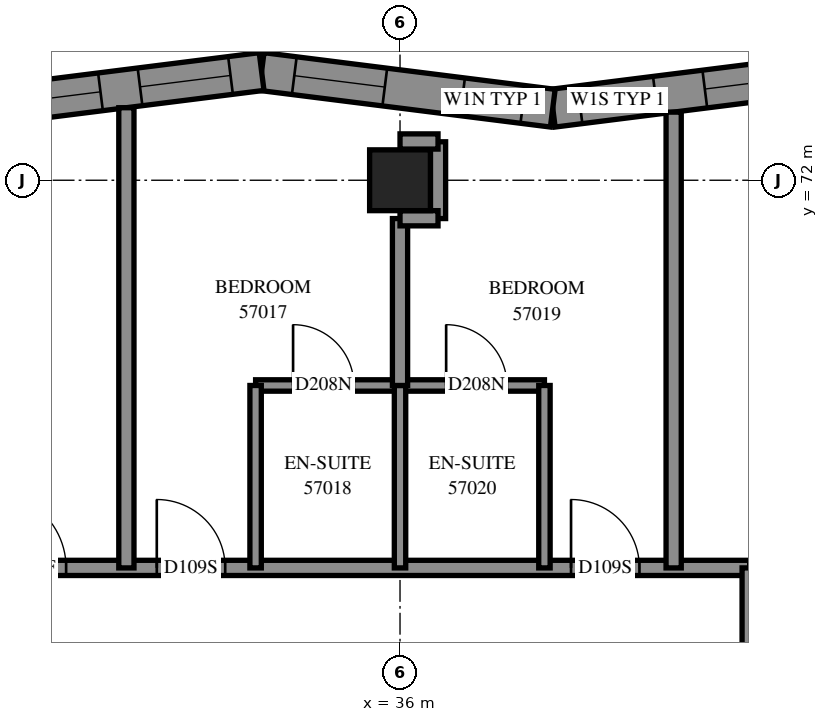
"""IFC4 building model, lengths in metres.
Left out: names, types, materials, properties, quantities, classifications, styles, units other than length and angle.
Written with IfcOpenShell. Run it as: python <this file> out.ifc"""

import sys

from ifc_helpers import new_model, si_unit, direction, frame, frame_2d, origin, origin_2d, place, context, subcontext, project, spatial, polyline, rectangle, outline, extrude, element, fill, save


model = new_model("IFC4")
c1 = context("Model", 3, precision=1e-05, world=origin(), true_north=direction((0.0, 1.0)))
c2 = subcontext(c1, "Body", "Model", "MODEL_VIEW")
j1 = project(units=[si_unit("LENGTHUNIT", "METRE"), si_unit("PLANEANGLEUNIT", "RADIAN")], contexts=[c1])
p1 = place(None, origin())
s1 = spatial("IfcSite", under=j1, at=p1, CompositionType="ELEMENT")
p2 = place(p1, origin())
s2 = spatial("IfcBuilding", under=s1, at=p2, CompositionType="ELEMENT")
p3 = place(p2, frame((0.0, 0.0, 210.0)))
s3 = spatial("IfcBuildingStorey", under=s2, at=p3, CompositionType="ELEMENT", Elevation=210.0)
p4 = place(p3, frame((36.0, 72.0, 0.0), z_axis=(0.0, 0.0, 1.0), x_axis=(1.0, 0.0, 0.0)))
e1 = element("IfcColumn", 1, at=p4, inside=s3, PredefinedType="COLUMN", context=c2, shape_type="SweptSolid", body=[
    extrude(rectangle(XDim=0.8, YDim=0.8, at=origin_2d()), origin(), (0.0, 0.0, 1.0), 3.1),
])
p5 = place(p3, frame((41.84, 73.43, 0.0), z_axis=(0.0, 0.0, 1.0), x_axis=(-0.9921759282, -0.1248476171, 0.0)))
e2 = element("IfcWall", 2, at=p5, inside=s3, PredefinedType="SOLIDWALL", context=c2, shape_type="SweptSolid", body=[
    extrude(outline(polyline([(-0.032, -0.25), (3.829, -0.25), (3.892, 0.25), (0.032, 0.25), (-0.032, -0.25)])), origin(), (0.0, 0.0, 1.0), 3.1),
])
p6 = place(p5, frame((0.645, 0.0, 0.45)))
e3 = element("IfcOpeningElement", 3, at=p6, cuts=e2, PredefinedType="OPENING", context=c2, shape_type="SweptSolid", body=[
    extrude(rectangle(XDim=1.2, YDim=2.5, at=frame_2d((0.6, 1.25))), frame((0.0, 0.26, 0.0), z_axis=(0.0, -1.0, 0.0), x_axis=(1.0, 0.0, 0.0)), (0.0, 0.0, 1.0), 0.52),
])
p7 = place(p5, frame((2.5, 0.0, 0.45)))
e4 = element("IfcOpeningElement", 4, at=p7, cuts=e2, PredefinedType="OPENING", context=c2, shape_type="SweptSolid", body=[
    extrude(rectangle(XDim=1.0, YDim=2.5, at=frame_2d((0.5, 1.25))), frame((0.0, 0.26, 0.0), z_axis=(0.0, -1.0, 0.0), x_axis=(1.0, 0.0, 0.0)), (0.0, 0.0, 1.0), 0.52),
])
p8 = place(p3, frame((38.01, 72.948, 0.0), z_axis=(0.0, 0.0, 1.0), x_axis=(-0.9921763319, 0.1248444087, 0.0)))
e5 = element("IfcWall", 5, at=p8, inside=s3, PredefinedType="SOLIDWALL", context=c2, shape_type="SweptSolid", body=[
    extrude(outline(polyline([(0.032, -0.25), (3.892, -0.25), (3.829, 0.25), (-0.032, 0.25), (0.032, -0.25)])), origin(), (0.0, 0.0, 1.0), 3.1),
])
p9 = place(p8, frame((2.227, 0.0, 0.45)))
e6 = element("IfcOpeningElement", 6, at=p9, cuts=e5, PredefinedType="OPENING", context=c2, shape_type="SweptSolid", body=[
    extrude(rectangle(XDim=1.2, YDim=2.5, at=frame_2d((0.6, 1.25))), frame((0.0, 0.26, 0.0), z_axis=(0.0, -1.0, 0.0), x_axis=(1.0, 0.0, 0.0)), (0.0, 0.0, 1.0), 0.52),
])
p10 = place(p8, frame((0.397, 0.0, 0.45)))
e7 = element("IfcOpeningElement", 7, at=p10, cuts=e5, PredefinedType="OPENING", context=c2, shape_type="SweptSolid", body=[
    extrude(rectangle(XDim=0.8, YDim=2.5, at=frame_2d((0.4, 1.25))), frame((0.0, 0.26, 0.0), z_axis=(0.0, -1.0, 0.0), x_axis=(1.0, 0.0, 0.0)), (0.0, 0.0, 1.0), 0.52),
])
p11 = place(p3, frame((34.179, 73.43, 0.0), z_axis=(0.0, 0.0, 1.0), x_axis=(-0.9921760365, -0.1248467561, 0.0)))
e8 = element("IfcWall", 8, at=p11, inside=s3, PredefinedType="SOLIDWALL", context=c2, shape_type="SweptSolid", body=[
    extrude(outline(polyline([(-0.032, -0.25), (3.829, -0.25), (3.931, 0.25), (0.032, 0.25), (-0.032, -0.25)])), origin(), (0.0, 0.0, 1.0), 3.1),
])
p12 = place(p11, frame((0.412, 0.0, 0.45)))
e9 = element("IfcOpeningElement", 9, at=p12, cuts=e8, PredefinedType="OPENING", context=c2, shape_type="SweptSolid", body=[
    extrude(rectangle(XDim=1.2, YDim=2.5, at=frame_2d((0.6, 1.25))), frame((0.0, 0.26, 0.0), z_axis=(0.0, -1.0, 0.0), x_axis=(1.0, 0.0, 0.0)), (0.0, 0.0, 1.0), 0.52),
])
p13 = place(p11, frame((2.136, 0.0, 0.45)))
e10 = element("IfcOpeningElement", 10, at=p13, cuts=e8, PredefinedType="OPENING", context=c2, shape_type="SweptSolid", body=[
    extrude(rectangle(XDim=1.2, YDim=2.5, at=frame_2d((0.6, 1.25))), frame((0.0, 0.26, 0.0), z_axis=(0.0, -1.0, 0.0), x_axis=(1.0, 0.0, 0.0)), (0.0, 0.0, 1.0), 0.52),
])
p14 = place(p3, frame((28.802, 66.9, 0.0), z_axis=(0.0, 0.0, 1.0), x_axis=(1.0, 0.0, 0.0)))
e11 = element("IfcWall", 11, at=p14, inside=s3, PredefinedType="PARTITIONING", context=c2, shape_type="SweptSolid", body=[
    extrude(rectangle(XDim=11.798, YDim=0.2, at=frame_2d((5.899, 0.0))), origin(), (0.0, 0.0, 1.0), 3.1),
])
p15 = place(p14, frame((1.805, 0.0, 0.0)))
e12 = element("IfcOpeningElement", 12, at=p15, cuts=e11, PredefinedType="OPENING", context=c2, shape_type="SweptSolid", body=[
    extrude(rectangle(XDim=1.0, YDim=2.1, at=frame_2d((0.5, 1.05))), frame((0.0, 0.11, 0.0), z_axis=(0.0, -1.0, 0.0), x_axis=(1.0, 0.0, 0.0)), (0.0, 0.0, 1.0), 0.22),
])
p16 = place(p14, frame((3.998, 0.0, 0.0)))
e13 = element("IfcOpeningElement", 13, at=p16, cuts=e11, PredefinedType="OPENING", context=c2, shape_type="SweptSolid", body=[
    extrude(rectangle(XDim=0.9, YDim=2.1, at=frame_2d((0.45, 1.05))), frame((0.0, 0.11, 0.0), z_axis=(0.0, -1.0, 0.0), x_axis=(1.0, 0.0, 0.0)), (0.0, 0.0, 1.0), 0.22),
])
p17 = place(p14, frame((9.448, 0.0, 0.0)))
e14 = element("IfcOpeningElement", 14, at=p17, cuts=e11, PredefinedType="OPENING", context=c2, shape_type="SweptSolid", body=[
    extrude(rectangle(XDim=0.9, YDim=2.1, at=frame_2d((0.45, 1.05))), frame((0.0, 0.11, 0.0), z_axis=(0.0, -1.0, 0.0), x_axis=(1.0, 0.0, 0.0)), (0.0, 0.0, 1.0), 0.22),
])
p18 = place(p3, frame((32.4, 66.9, 0.0), z_axis=(0.0, 0.0, 1.0), x_axis=(0.0, 1.0, 0.0)))
e15 = element("IfcWall", 15, at=p18, inside=s3, PredefinedType="PARTITIONING", context=c2, shape_type="SweptSolid", body=[
    extrude(rectangle(XDim=6.054, YDim=0.2, at=frame_2d((3.027, 0.0))), origin(), (0.0, 0.0, 1.0), 3.1),
])
p19 = place(p3, frame((39.6, 66.9, 0.0), z_axis=(0.0, 0.0, 1.0), x_axis=(0.0, 1.0, 0.0)))
e16 = element("IfcWall", 16, at=p19, inside=s3, PredefinedType="PARTITIONING", context=c2, shape_type="SweptSolid", body=[
    extrude(rectangle(XDim=5.996, YDim=0.2, at=frame_2d((2.998, 0.0))), origin(), (0.0, 0.0, 1.0), 3.1),
])
p20 = place(p3, frame((40.6, 62.202, 0.0), z_axis=(0.0, 0.0, 1.0), x_axis=(0.0, 1.0, 0.0)))
e17 = element("IfcWall", 17, at=p20, inside=s3, PredefinedType="PARTITIONING", context=c2, shape_type="SweptSolid", body=[
    extrude(rectangle(XDim=4.698, YDim=0.2, at=frame_2d((2.349, 0.0))), origin(), (0.0, 0.0, 1.0), 3.1),
])
p21 = place(p20, frame((2.51, 0.0, 0.0)))
e18 = element("IfcOpeningElement", 18, at=p21, cuts=e17, PredefinedType="OPENING", context=c2, shape_type="SweptSolid", body=[
    extrude(rectangle(XDim=0.9, YDim=2.1, at=frame_2d((0.45, 1.05))), frame((0.0, 0.11, 0.0), z_axis=(0.0, -1.0, 0.0), x_axis=(1.0, 0.0, 0.0)), (0.0, 0.0, 1.0), 0.22),
])
p22 = place(p3, frame((34.1, 69.3, 0.0), z_axis=(0.0, 0.0, 1.0), x_axis=(1.0, 0.0, 0.0)))
e19 = element("IfcWall", 19, at=p22, inside=s3, PredefinedType="PARTITIONING", context=c2, shape_type="SweptSolid", body=[
    extrude(rectangle(XDim=3.8, YDim=0.15, at=frame_2d((1.9, 0.0))), origin(), (0.0, 0.0, 1.0), 3.1),
])
p23 = place(p22, frame((0.493, 0.0, 0.0)))
e20 = element("IfcOpeningElement", 20, at=p23, cuts=e19, PredefinedType="OPENING", context=c2, shape_type="SweptSolid", body=[
    extrude(rectangle(XDim=0.8, YDim=2.1, at=frame_2d((0.4, 1.05))), frame((0.0, 0.085, 0.0), z_axis=(0.0, -1.0, 0.0), x_axis=(1.0, 0.0, 0.0)), (0.0, 0.0, 1.0), 0.17),
])
p24 = place(p22, frame((2.507, 0.0, 0.0)))
e21 = element("IfcOpeningElement", 21, at=p24, cuts=e19, PredefinedType="OPENING", context=c2, shape_type="SweptSolid", body=[
    extrude(rectangle(XDim=0.8, YDim=2.1, at=frame_2d((0.4, 1.05))), frame((0.0, 0.085, 0.0), z_axis=(0.0, -1.0, 0.0), x_axis=(1.0, 0.0, 0.0)), (0.0, 0.0, 1.0), 0.17),
])
for number, where, z_axis, x_axis in (
    (22, (34.1, 66.9, 0.0), (0.0, 0.0, 1.0), (0.0, 1.0, 0.0)),
    (23, (36.0, 66.9, 0.0), (0.0, 0.0, 1.0), (0.0, 1.0, 0.0)),
    (24, (37.9, 66.9, 0.0), (0.0, 0.0, 1.0), (0.0, 1.0, 0.0)),
):
    element("IfcWall", number, at=place(p3, frame(where, z_axis=z_axis, x_axis=x_axis)), inside=s3, PredefinedType="PARTITIONING", context=c2, shape_type="SweptSolid", body=[
        extrude(rectangle(XDim=2.4, YDim=0.15, at=frame_2d((1.2, 0.0))), origin(), (0.0, 0.0, 1.0), 3.1),
    ])
p25 = place(p3, frame((36.0, 69.3, 0.0), z_axis=(0.0, 0.0, 1.0), x_axis=(0.0, 1.0, 0.0)))
e25 = element("IfcWall", 25, at=p25, inside=s3, PredefinedType="PARTITIONING", context=c2, shape_type="SweptSolid", body=[
    extrude(rectangle(XDim=2.196, YDim=0.2, at=frame_2d((1.098, 0.0))), origin(), (0.0, 0.0, 1.0), 3.1),
])
p26 = place(p3, frame((36.5, 71.496, 0.0), z_axis=(0.0, 0.0, 1.0), x_axis=(0.0, 1.0, 0.0)))
e26 = element("IfcWall", 26, at=p26, inside=s3, PredefinedType="PARTITIONING", context=c2, shape_type="SweptSolid", body=[
    extrude(rectangle(XDim=1.01, YDim=0.2, at=frame_2d((0.505, 0.0))), origin(), (0.0, 0.0, 1.0), 3.1),
])
for number, where, z_axis, x_axis in (
    (27, (36.0, 72.51, 0.0), (0.0, 0.0, 1.0), (1.0, 0.0, 0.0)),
    (28, (36.0, 71.5, 0.0), (0.0, 0.0, 1.0), (1.0, 0.0, 0.0)),
):
    element("IfcWall", number, at=place(p3, frame(where, z_axis=z_axis, x_axis=x_axis)), inside=s3, PredefinedType="PARTITIONING", context=c2, shape_type="SweptSolid", body=[
        extrude(rectangle(XDim=0.5, YDim=0.2, at=frame_2d((0.25, 0.0))), origin(), (0.0, 0.0, 1.0), 3.1),
    ])
p27 = place(p6, origin())
e29 = element("IfcWindow", 29, at=p27, inside=s3, PartitioningType="SINGLE_PANEL", PredefinedType="WINDOW", context=c2, shape_type="SweptSolid", body=[
    extrude(rectangle(XDim=1.2, YDim=2.5, at=frame_2d((0.6, 1.25))), frame((0.0, 0.18, 0.0), z_axis=(0.0, -1.0, 0.0), x_axis=(1.0, 0.0, 0.0)), (0.0, 0.0, 1.0), 0.06),
])
fill(e3, e29)
p28 = place(p9, origin())
e30 = element("IfcWindow", 30, at=p28, inside=s3, PartitioningType="SINGLE_PANEL", PredefinedType="WINDOW", context=c2, shape_type="SweptSolid", body=[
    extrude(rectangle(XDim=1.2, YDim=2.5, at=frame_2d((0.6, 1.25))), frame((0.0, 0.18, 0.0), z_axis=(0.0, -1.0, 0.0), x_axis=(1.0, 0.0, 0.0)), (0.0, 0.0, 1.0), 0.06),
])
fill(e6, e30)
p29 = place(p12, origin())
e31 = element("IfcWindow", 31, at=p29, inside=s3, PartitioningType="SINGLE_PANEL", PredefinedType="WINDOW", context=c2, shape_type="SweptSolid", body=[
    extrude(rectangle(XDim=1.2, YDim=2.5, at=frame_2d((0.6, 1.25))), frame((0.0, 0.18, 0.0), z_axis=(0.0, -1.0, 0.0), x_axis=(1.0, 0.0, 0.0)), (0.0, 0.0, 1.0), 0.06),
])
fill(e9, e31)
p30 = place(p13, origin())
e32 = element("IfcWindow", 32, at=p30, inside=s3, PartitioningType="SINGLE_PANEL", PredefinedType="WINDOW", context=c2, shape_type="SweptSolid", body=[
    extrude(rectangle(XDim=1.2, YDim=2.5, at=frame_2d((0.6, 1.25))), frame((0.0, 0.18, 0.0), z_axis=(0.0, -1.0, 0.0), x_axis=(1.0, 0.0, 0.0)), (0.0, 0.0, 1.0), 0.06),
])
fill(e10, e32)
p31 = place(p15, origin())
e33 = element("IfcDoor", 33, at=p31, inside=s3, OperationType="SINGLE_SWING_RIGHT", PredefinedType="DOOR", context=c2, shape_type="SweptSolid", body=[
    extrude(rectangle(XDim=1.0, YDim=2.1, at=frame_2d((0.5, 1.05))), frame((0.0, 0.025, 0.0), z_axis=(0.0, -1.0, 0.0), x_axis=(1.0, 0.0, 0.0)), (0.0, 0.0, 1.0), 0.05),
])
fill(e12, e33)
p32 = place(p16, origin())
e34 = element("IfcDoor", 34, at=p32, inside=s3, OperationType="SINGLE_SWING_LEFT", PredefinedType="DOOR", context=c2, shape_type="SweptSolid", body=[
    extrude(rectangle(XDim=0.9, YDim=2.1, at=frame_2d((0.45, 1.05))), frame((0.0, 0.025, 0.0), z_axis=(0.0, -1.0, 0.0), x_axis=(1.0, 0.0, 0.0)), (0.0, 0.0, 1.0), 0.05),
])
fill(e13, e34)
p33 = place(p23, origin())
e35 = element("IfcDoor", 35, at=p33, inside=s3, OperationType="SINGLE_SWING_RIGHT", PredefinedType="DOOR", context=c2, shape_type="SweptSolid", body=[
    extrude(rectangle(XDim=0.8, YDim=2.1, at=frame_2d((0.4, 1.05))), frame((0.0, 0.025, 0.0), z_axis=(0.0, -1.0, 0.0), x_axis=(1.0, 0.0, 0.0)), (0.0, 0.0, 1.0), 0.05),
])
fill(e20, e35)
p34 = place(p17, origin())
e36 = element("IfcDoor", 36, at=p34, inside=s3, OperationType="SINGLE_SWING_RIGHT", PredefinedType="DOOR", context=c2, shape_type="SweptSolid", body=[
    extrude(rectangle(XDim=0.9, YDim=2.1, at=frame_2d((0.45, 1.05))), frame((0.0, 0.025, 0.0), z_axis=(0.0, -1.0, 0.0), x_axis=(1.0, 0.0, 0.0)), (0.0, 0.0, 1.0), 0.05),
])
fill(e14, e36)
p35 = place(p24, origin())
e37 = element("IfcDoor", 37, at=p35, inside=s3, OperationType="SINGLE_SWING_RIGHT", PredefinedType="DOOR", context=c2, shape_type="SweptSolid", body=[
    extrude(rectangle(XDim=0.8, YDim=2.1, at=frame_2d((0.4, 1.05))), frame((0.0, 0.025, 0.0), z_axis=(0.0, -1.0, 0.0), x_axis=(1.0, 0.0, 0.0)), (0.0, 0.0, 1.0), 0.05),
])
fill(e21, e37)
p36 = place(p7, origin())
e38 = element("IfcWindow", 38, at=p36, inside=s3, PartitioningType="SINGLE_PANEL", PredefinedType="WINDOW", context=c2, shape_type="SweptSolid", body=[
    extrude(rectangle(XDim=1.0, YDim=2.5, at=frame_2d((0.5, 1.25))), frame((0.0, 0.18, 0.0), z_axis=(0.0, -1.0, 0.0), x_axis=(1.0, 0.0, 0.0)), (0.0, 0.0, 1.0), 0.06),
])
fill(e4, e38)
p37 = place(p10, origin())
e39 = element("IfcWindow", 39, at=p37, inside=s3, PartitioningType="SINGLE_PANEL", PredefinedType="WINDOW", context=c2, shape_type="SweptSolid", body=[
    extrude(rectangle(XDim=0.8, YDim=2.5, at=frame_2d((0.4, 1.25))), frame((0.0, 0.18, 0.0), z_axis=(0.0, -1.0, 0.0), x_axis=(1.0, 0.0, 0.0)), (0.0, 0.0, 1.0), 0.06),
])
fill(e7, e39)
save(model, sys.argv[1])
